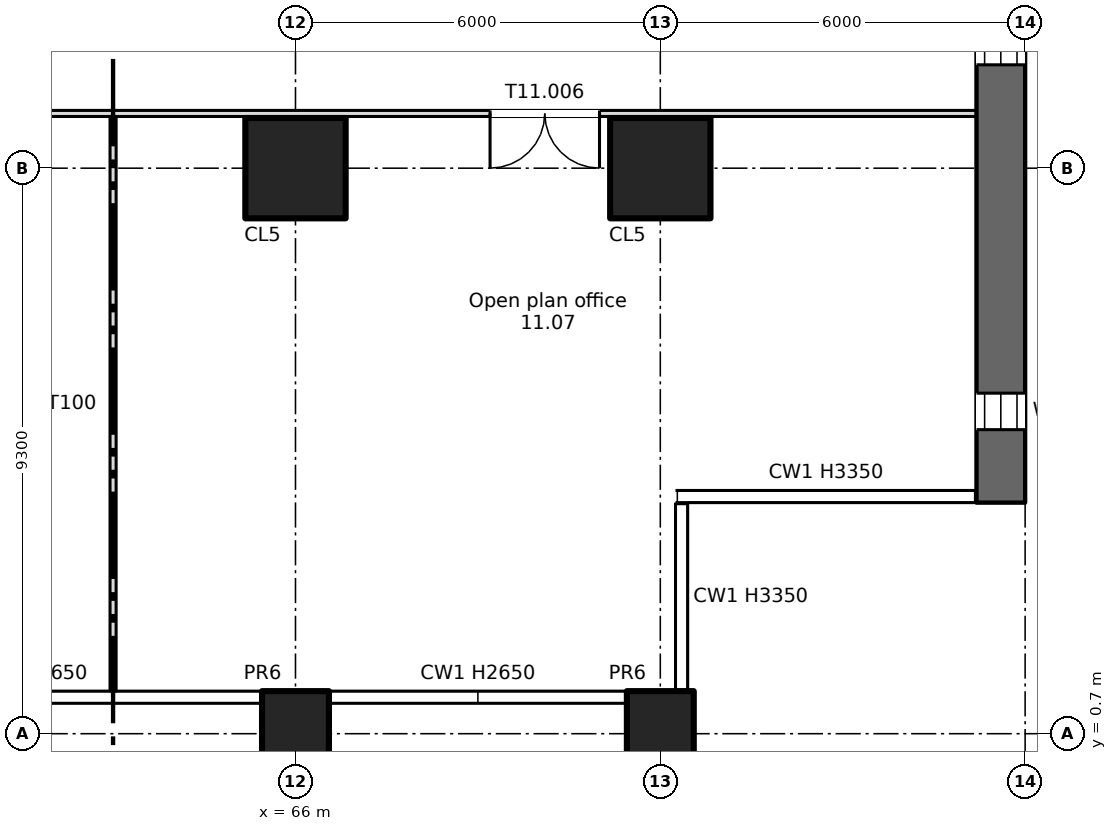
"""IFC4 building model, lengths in metres.
Left out: names, types, materials, properties, quantities, classifications, styles, units other than length and angle.
Written with IfcOpenShell. Run it as: python <this file> out.ifc"""

import sys

from ifc_helpers import new_model, si_unit, direction, frame, frame_2d, origin, origin_2d, place, context, subcontext, project, spatial, rectangle, extrude, element, fill, save


model = new_model("IFC4")
c1 = context("Model", 3, precision=1e-05, world=origin(), true_north=direction((0.0, 1.0)))
c2 = subcontext(c1, "Body", "Model", "MODEL_VIEW")
j1 = project(units=[si_unit("LENGTHUNIT", "METRE"), si_unit("PLANEANGLEUNIT", "RADIAN")], contexts=[c1])
p1 = place(None, origin())
s1 = spatial("IfcSite", under=j1, at=p1, CompositionType="ELEMENT")
p2 = place(p1, origin())
s2 = spatial("IfcBuilding", under=s1, at=p2, CompositionType="ELEMENT")
p3 = place(p2, frame((0.0, 0.0, 56.25)))
s3 = spatial("IfcBuildingStorey", under=s2, at=p3, CompositionType="ELEMENT", Elevation=56.25)
for number, where, z_axis, x_axis in (
    (1, (66.0, 0.7, -0.4), (0.0, 0.0, 1.0), (1.0, 0.0, 0.0)),
    (2, (72.0, 0.7, -0.4), (0.0, 0.0, 1.0), (1.0, 0.0, 0.0)),
):
    element("IfcColumn", number, at=place(p3, frame(where, z_axis=z_axis, x_axis=x_axis)), inside=s3, PredefinedType="COLUMN", context=c2, shape_type="SweptSolid", body=[
        extrude(rectangle(XDim=1.1, YDim=1.4, at=origin_2d()), origin(), (0.0, 0.0, 1.0), 3.75),
    ])
for number, where, z_axis, x_axis in (
    (3, (66.0, 10.0, 0.0), (0.0, 0.0, 1.0), (1.0, 0.0, 0.0)),
    (4, (72.0, 10.0, 0.0), (0.0, 0.0, 1.0), (1.0, 0.0, 0.0)),
):
    element("IfcColumn", number, at=place(p3, frame(where, z_axis=z_axis, x_axis=x_axis)), inside=s3, PredefinedType="COLUMN", context=c2, shape_type="SweptSolid", body=[
        extrude(rectangle(XDim=1.65, YDim=1.65, at=origin_2d()), origin(), (0.0, 0.0, 1.0), 3.35),
    ])
p4 = place(p3, frame((77.6, 4.5, 0.0), z_axis=(0.0, 0.0, 1.0), x_axis=(0.0, 1.0, 0.0)))
e5 = element("IfcWall", 5, at=p4, inside=s3, PredefinedType="SHEAR", context=c2, shape_type="SweptSolid", body=[
    extrude(rectangle(XDim=37.0, YDim=0.8, at=frame_2d((18.5, 0.0))), origin(), (0.0, 0.0, 1.0), 3.35),
])
p5 = place(p4, frame((1.2, 0.0, 0.6)))
e6 = element("IfcOpeningElement", 6, at=p5, cuts=e5, PredefinedType="OPENING", context=c2, shape_type="SweptSolid", body=[
    extrude(rectangle(XDim=0.6, YDim=2.4, at=frame_2d((0.3, 1.2))), frame((0.0, 0.41, 0.0), z_axis=(0.0, -1.0, 0.0), x_axis=(1.0, 0.0, 0.0)), (0.0, 0.0, 1.0), 0.82),
])
p6 = place(p4, frame((7.2, 0.0, 0.6)))
e7 = element("IfcOpeningElement", 7, at=p6, cuts=e5, PredefinedType="OPENING", context=c2, shape_type="SweptSolid", body=[
    extrude(rectangle(XDim=0.6, YDim=2.4, at=frame_2d((0.3, 1.2))), frame((0.0, 0.41, 0.0), z_axis=(0.0, -1.0, 0.0), x_axis=(1.0, 0.0, 0.0)), (0.0, 0.0, 1.0), 0.82),
])
p7 = place(p4, frame((13.2, 0.0, 0.6)))
e8 = element("IfcOpeningElement", 8, at=p7, cuts=e5, PredefinedType="OPENING", context=c2, shape_type="SweptSolid", body=[
    extrude(rectangle(XDim=0.6, YDim=2.4, at=frame_2d((0.3, 1.2))), frame((0.0, 0.41, 0.0), z_axis=(0.0, -1.0, 0.0), x_axis=(1.0, 0.0, 0.0)), (0.0, 0.0, 1.0), 0.82),
])
p8 = place(p4, frame((19.2, 0.0, 0.6)))
e9 = element("IfcOpeningElement", 9, at=p8, cuts=e5, PredefinedType="OPENING", context=c2, shape_type="SweptSolid", body=[
    extrude(rectangle(XDim=0.6, YDim=2.4, at=frame_2d((0.3, 1.2))), frame((0.0, 0.41, 0.0), z_axis=(0.0, -1.0, 0.0), x_axis=(1.0, 0.0, 0.0)), (0.0, 0.0, 1.0), 0.82),
])
p9 = place(p4, frame((25.2, 0.0, 0.6)))
e10 = element("IfcOpeningElement", 10, at=p9, cuts=e5, PredefinedType="OPENING", context=c2, shape_type="SweptSolid", body=[
    extrude(rectangle(XDim=0.6, YDim=2.4, at=frame_2d((0.3, 1.2))), frame((0.0, 0.41, 0.0), z_axis=(0.0, -1.0, 0.0), x_axis=(1.0, 0.0, 0.0)), (0.0, 0.0, 1.0), 0.82),
])
p10 = place(p4, frame((31.2, 0.0, 0.6)))
e11 = element("IfcOpeningElement", 11, at=p10, cuts=e5, PredefinedType="OPENING", context=c2, shape_type="SweptSolid", body=[
    extrude(rectangle(XDim=0.6, YDim=2.4, at=frame_2d((0.3, 1.2))), frame((0.0, 0.41, 0.0), z_axis=(0.0, -1.0, 0.0), x_axis=(1.0, 0.0, 0.0)), (0.0, 0.0, 1.0), 0.82),
])
p11 = place(p3, frame((0.8, 10.9, 0.0), z_axis=(0.0, 0.0, 1.0), x_axis=(1.0, 0.0, 0.0)))
e12 = element("IfcWall", 12, at=p11, inside=s3, PredefinedType="PARTITIONING", context=c2, shape_type="SweptSolid", body=[
    extrude(rectangle(XDim=76.4, YDim=0.1, at=frame_2d((38.2, 0.0))), origin(), (0.0, 0.0, 1.0), 3.35),
])
p12 = place(p11, frame((12.05, 0.0, 0.0)))
e13 = element("IfcOpeningElement", 13, at=p12, cuts=e12, PredefinedType="OPENING", context=c2, shape_type="SweptSolid", body=[
    extrude(rectangle(XDim=1.8, YDim=2.1, at=frame_2d((0.9, 1.05))), frame((0.0, 0.06, 0.0), z_axis=(0.0, -1.0, 0.0), x_axis=(1.0, 0.0, 0.0)), (0.0, 0.0, 1.0), 0.12),
])
p13 = place(p11, frame((56.55, 0.0, 0.0)))
e14 = element("IfcOpeningElement", 14, at=p13, cuts=e12, PredefinedType="OPENING", context=c2, shape_type="SweptSolid", body=[
    extrude(rectangle(XDim=1.8, YDim=2.1, at=frame_2d((0.9, 1.05))), frame((0.0, 0.06, 0.0), z_axis=(0.0, -1.0, 0.0), x_axis=(1.0, 0.0, 0.0)), (0.0, 0.0, 1.0), 0.12),
])
p14 = place(p11, frame((24.05, 0.0, 0.0)))
e15 = element("IfcOpeningElement", 15, at=p14, cuts=e12, PredefinedType="OPENING", context=c2, shape_type="SweptSolid", body=[
    extrude(rectangle(XDim=1.8, YDim=2.1, at=frame_2d((0.9, 1.05))), frame((0.0, 0.06, 0.0), z_axis=(0.0, -1.0, 0.0), x_axis=(1.0, 0.0, 0.0)), (0.0, 0.0, 1.0), 0.12),
])
p15 = place(p11, frame((36.05, 0.0, 0.0)))
e16 = element("IfcOpeningElement", 16, at=p15, cuts=e12, PredefinedType="OPENING", context=c2, shape_type="SweptSolid", body=[
    extrude(rectangle(XDim=1.8, YDim=2.1, at=frame_2d((0.9, 1.05))), frame((0.0, 0.06, 0.0), z_axis=(0.0, -1.0, 0.0), x_axis=(1.0, 0.0, 0.0)), (0.0, 0.0, 1.0), 0.12),
])
p16 = place(p11, frame((48.05, 0.0, 0.0)))
e17 = element("IfcOpeningElement", 17, at=p16, cuts=e12, PredefinedType="OPENING", context=c2, shape_type="SweptSolid", body=[
    extrude(rectangle(XDim=1.8, YDim=2.1, at=frame_2d((0.9, 1.05))), frame((0.0, 0.06, 0.0), z_axis=(0.0, -1.0, 0.0), x_axis=(1.0, 0.0, 0.0)), (0.0, 0.0, 1.0), 0.12),
])
p17 = place(p11, frame((68.4, 0.0, 0.0)))
e18 = element("IfcOpeningElement", 18, at=p17, cuts=e12, PredefinedType="OPENING", context=c2, shape_type="SweptSolid", body=[
    extrude(rectangle(XDim=1.8, YDim=2.1, at=frame_2d((0.9, 1.05))), frame((0.0, 0.06, 0.0), z_axis=(0.0, -1.0, 0.0), x_axis=(1.0, 0.0, 0.0)), (0.0, 0.0, 1.0), 0.12),
])
p18 = place(p11, frame((2.45, 0.0, 0.0)))
e19 = element("IfcOpeningElement", 19, at=p18, cuts=e12, PredefinedType="OPENING", context=c2, shape_type="SweptSolid", body=[
    extrude(rectangle(XDim=1.8, YDim=2.1, at=frame_2d((0.9, 1.05))), frame((0.0, 0.06, 0.0), z_axis=(0.0, -1.0, 0.0), x_axis=(1.0, 0.0, 0.0)), (0.0, 0.0, 1.0), 0.12),
])
p19 = place(p3, frame((63.0, 1.4, 0.0), z_axis=(0.0, 0.0, 1.0), x_axis=(0.0, 1.0, 0.0)))
e20 = element("IfcWall", 20, at=p19, inside=s3, PredefinedType="PARTITIONING", context=c2, shape_type="SweptSolid", body=[
    extrude(rectangle(XDim=9.45, YDim=0.1, at=frame_2d((4.725, 0.0))), origin(), (0.0, 0.0, 1.0), 3.35),
])
p20 = place(p5, origin())
e21 = element("IfcWindow", 21, at=p20, inside=s3, PartitioningType="SINGLE_PANEL", PredefinedType="WINDOW", context=c2, shape_type="SweptSolid", body=[
    extrude(rectangle(XDim=0.6, YDim=2.4, at=frame_2d((0.3, 1.2))), frame((0.0, 0.03, 0.0), z_axis=(0.0, -1.0, 0.0), x_axis=(1.0, 0.0, 0.0)), (0.0, 0.0, 1.0), 0.06),
])
fill(e6, e21)
p21 = place(p6, origin())
e22 = element("IfcWindow", 22, at=p21, inside=s3, PartitioningType="SINGLE_PANEL", PredefinedType="WINDOW", context=c2, shape_type="SweptSolid", body=[
    extrude(rectangle(XDim=0.6, YDim=2.4, at=frame_2d((0.3, 1.2))), frame((0.0, 0.03, 0.0), z_axis=(0.0, -1.0, 0.0), x_axis=(1.0, 0.0, 0.0)), (0.0, 0.0, 1.0), 0.06),
])
fill(e7, e22)
p22 = place(p17, origin())
e23 = element("IfcDoor", 23, at=p22, inside=s3, OperationType="DOUBLE_DOOR_SINGLE_SWING", PredefinedType="DOOR", context=c2, shape_type="SweptSolid", body=[
    extrude(rectangle(XDim=1.8, YDim=2.1, at=frame_2d((0.9, 1.05))), frame((0.0, 0.025, 0.0), z_axis=(0.0, -1.0, 0.0), x_axis=(1.0, 0.0, 0.0)), (0.0, 0.0, 1.0), 0.05),
])
fill(e18, e23)
save(model, sys.argv[1])
